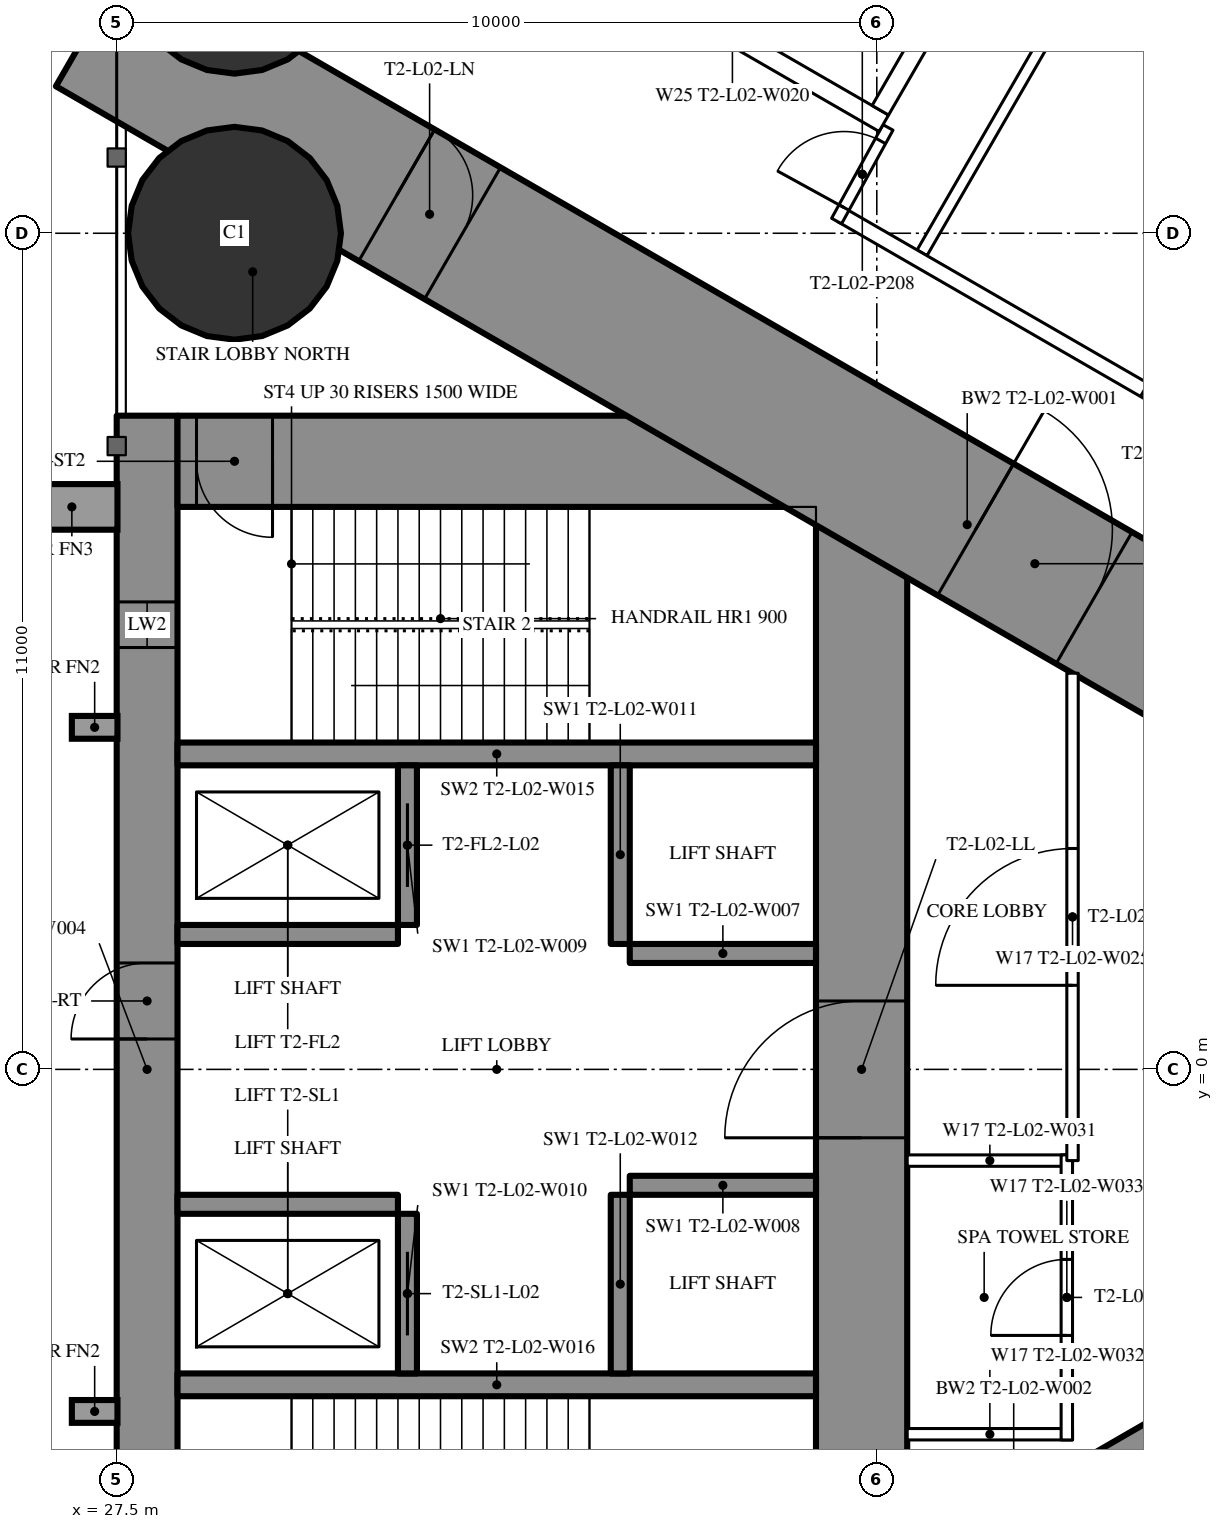
"""IFC4 building model, lengths in metres.
Left out: names, types, materials, properties, quantities, classifications, styles, units other than length and angle.
Written with IfcOpenShell. Run it as: python <this file> out.ifc"""

import sys

from ifc_helpers import new_model, si_unit, direction, frame, frame_2d, origin, origin_2d, place, context, subcontext, project, spatial, rectangle, hollow_circle, extrude, element, fill, save


model = new_model("IFC4")
c1 = context("Model", 3, precision=1e-05, world=origin(), true_north=direction((0.0, 1.0)))
c2 = subcontext(c1, "Body", "Model", "MODEL_VIEW")
j1 = project(units=[si_unit("LENGTHUNIT", "METRE"), si_unit("PLANEANGLEUNIT", "RADIAN")], contexts=[c1])
p1 = place(None, origin())
s1 = spatial("IfcSite", under=j1, at=p1, CompositionType="ELEMENT")
p2 = place(p1, origin())
s2 = spatial("IfcBuilding", under=s1, at=p2, CompositionType="ELEMENT")
p3 = place(p2, frame((0.0, 0.0, 12.6)))
s3 = spatial("IfcBuildingStorey", under=s2, at=p3, CompositionType="ELEMENT", Elevation=12.6)
for number, where, z_axis, x_axis in (
    (1, (29.05, 11.0, 0.0), (0.0, 0.0, 1.0), (1.0, 0.0, 0.0)),
    (2, (29.05, 14.5, 0.0), (0.0, 0.0, 1.0), (1.0, 0.0, 0.0)),
):
    element("IfcColumn", number, at=place(p3, frame(where, z_axis=z_axis, x_axis=x_axis)), inside=s3, PredefinedType="COLUMN", context=c2, shape_type="SweptSolid", body=[
        extrude(hollow_circle(Radius=1.4, WallThickness=0.12, at=origin_2d()), origin(), (0.0, 0.0, 1.0), 5.4),
    ])
p4 = place(p3, frame((27.9, -8.6, 0.0), z_axis=(0.0, 0.0, 1.0), x_axis=(0.0, 1.0, 0.0)))
e3 = element("IfcWall", 3, at=p4, inside=s3, PredefinedType="SHEAR", context=c2, shape_type="SweptSolid", body=[
    extrude(rectangle(XDim=17.2, YDim=0.8, at=frame_2d((8.6, 0.0))), origin(), (0.0, 0.0, 1.0), 5.4),
])
p5 = place(p4, frame((9.0, 0.0, 0.0)))
e4 = element("IfcOpeningElement", 4, at=p5, cuts=e3, PredefinedType="OPENING", context=c2, shape_type="SweptSolid", body=[
    extrude(rectangle(XDim=1.0, YDim=2.2, at=frame_2d((0.5, 1.1))), frame((0.0, 0.41, 0.0), z_axis=(0.0, -1.0, 0.0), x_axis=(1.0, 0.0, 0.0)), (0.0, 0.0, 1.0), 0.82),
])
p6 = place(p4, frame((2.45, 0.0, 0.6)))
e5 = element("IfcOpeningElement", 5, at=p6, cuts=e3, PredefinedType="OPENING", context=c2, shape_type="SweptSolid", body=[
    extrude(rectangle(XDim=0.6, YDim=3.9, at=frame_2d((0.3, 1.95))), frame((0.0, 0.41, 0.0), z_axis=(0.0, -1.0, 0.0), x_axis=(1.0, 0.0, 0.0)), (0.0, 0.0, 1.0), 0.82),
])
p7 = place(p4, frame((14.15, 0.0, 0.6)))
e6 = element("IfcOpeningElement", 6, at=p7, cuts=e3, PredefinedType="OPENING", context=c2, shape_type="SweptSolid", body=[
    extrude(rectangle(XDim=0.6, YDim=3.9, at=frame_2d((0.3, 1.95))), frame((0.0, 0.41, 0.0), z_axis=(0.0, -1.0, 0.0), x_axis=(1.0, 0.0, 0.0)), (0.0, 0.0, 1.0), 0.82),
])
p8 = place(p3, frame((37.3, -8.6, 0.0), z_axis=(0.0, 0.0, 1.0), x_axis=(0.0, 1.0, 0.0)))
e7 = element("IfcWall", 7, at=p8, inside=s3, PredefinedType="SHEAR", context=c2, shape_type="SweptSolid", body=[
    extrude(rectangle(XDim=17.2, YDim=1.2, at=frame_2d((8.6, 0.0))), origin(), (0.0, 0.0, 1.0), 5.4),
])
p9 = place(p8, frame((7.7, 0.0, 0.0)))
e8 = element("IfcOpeningElement", 8, at=p9, cuts=e7, PredefinedType="OPENING", context=c2, shape_type="SweptSolid", body=[
    extrude(rectangle(XDim=1.8, YDim=2.2, at=frame_2d((0.9, 1.1))), frame((0.0, 0.61, 0.0), z_axis=(0.0, -1.0, 0.0), x_axis=(1.0, 0.0, 0.0)), (0.0, 0.0, 1.0), 1.22),
])
p10 = place(p3, frame((28.3, 8.0, 0.0), z_axis=(0.0, 0.0, 1.0), x_axis=(1.0, 0.0, 0.0)))
e9 = element("IfcWall", 9, at=p10, inside=s3, PredefinedType="SHEAR", context=c2, shape_type="SweptSolid", body=[
    extrude(rectangle(XDim=8.4, YDim=1.2, at=frame_2d((4.2, 0.0))), origin(), (0.0, 0.0, 1.0), 5.4),
])
p11 = place(p10, frame((0.25, 0.0, 0.0)))
e10 = element("IfcOpeningElement", 10, at=p11, cuts=e9, PredefinedType="OPENING", context=c2, shape_type="SweptSolid", body=[
    extrude(rectangle(XDim=1.0, YDim=2.2, at=frame_2d((0.5, 1.1))), frame((0.0, 0.61, 0.0), z_axis=(0.0, -1.0, 0.0), x_axis=(1.0, 0.0, 0.0)), (0.0, 0.0, 1.0), 1.22),
])
for number, where, z_axis, x_axis in (
    (11, (28.3, -4.15, 0.0), (0.0, 0.0, 1.0), (1.0, 0.0, 0.0)),
    (12, (28.3, 4.15, 0.0), (0.0, 0.0, 1.0), (1.0, 0.0, 0.0)),
):
    element("IfcWall", number, at=place(p3, frame(where, z_axis=z_axis, x_axis=x_axis)), inside=s3, PredefinedType="SHEAR", context=c2, shape_type="SweptSolid", body=[
        extrude(rectangle(XDim=8.4, YDim=0.3, at=frame_2d((4.2, 0.0))), origin(), (0.0, 0.0, 1.0), 5.4),
    ])
p12 = place(p3, frame((31.325, -4.0, 0.0), z_axis=(0.0, 0.0, 1.0), x_axis=(0.0, 1.0, 0.0)))
e13 = element("IfcWall", 13, at=p12, inside=s3, PredefinedType="SHEAR", context=c2, shape_type="SweptSolid", body=[
    extrude(rectangle(XDim=2.1, YDim=0.25, at=frame_2d((1.05, 0.0))), origin(), (0.0, 0.0, 1.0), 5.4),
])
p13 = place(p12, frame((0.5, 0.0, 0.0)))
e14 = element("IfcOpeningElement", 14, at=p13, cuts=e13, PredefinedType="OPENING", context=c2, shape_type="SweptSolid", body=[
    extrude(rectangle(XDim=1.1, YDim=2.2, at=frame_2d((0.55, 1.1))), frame((0.0, 0.135, 0.0), z_axis=(0.0, -1.0, 0.0), x_axis=(1.0, 0.0, 0.0)), (0.0, 0.0, 1.0), 0.27),
])
p14 = place(p3, frame((34.125, -4.0, 0.0), z_axis=(0.0, 0.0, 1.0), x_axis=(0.0, 1.0, 0.0)))
e15 = element("IfcWall", 15, at=p14, inside=s3, PredefinedType="SHEAR", context=c2, shape_type="SweptSolid", body=[
    extrude(rectangle(XDim=2.35, YDim=0.25, at=frame_2d((1.175, 0.0))), origin(), (0.0, 0.0, 1.0), 5.4),
])
p15 = place(p3, frame((28.3, -1.775, 0.0), z_axis=(0.0, 0.0, 1.0), x_axis=(1.0, 0.0, 0.0)))
e16 = element("IfcWall", 16, at=p15, inside=s3, PredefinedType="SHEAR", context=c2, shape_type="SweptSolid", body=[
    extrude(rectangle(XDim=2.9, YDim=0.25, at=frame_2d((1.45, 0.0))), origin(), (0.0, 0.0, 1.0), 5.4),
])
p16 = place(p3, frame((34.25, -1.525, 0.0), z_axis=(0.0, 0.0, 1.0), x_axis=(1.0, 0.0, 0.0)))
e17 = element("IfcWall", 17, at=p16, inside=s3, PredefinedType="SHEAR", context=c2, shape_type="SweptSolid", body=[
    extrude(rectangle(XDim=2.45, YDim=0.25, at=frame_2d((1.225, 0.0))), origin(), (0.0, 0.0, 1.0), 5.4),
])
p17 = place(p3, frame((31.325, 1.9, 0.0), z_axis=(0.0, 0.0, 1.0), x_axis=(0.0, 1.0, 0.0)))
e18 = element("IfcWall", 18, at=p17, inside=s3, PredefinedType="SHEAR", context=c2, shape_type="SweptSolid", body=[
    extrude(rectangle(XDim=2.1, YDim=0.25, at=frame_2d((1.05, 0.0))), origin(), (0.0, 0.0, 1.0), 5.4),
])
p18 = place(p17, frame((0.5, 0.0, 0.0)))
e19 = element("IfcOpeningElement", 19, at=p18, cuts=e18, PredefinedType="OPENING", context=c2, shape_type="SweptSolid", body=[
    extrude(rectangle(XDim=1.1, YDim=2.2, at=frame_2d((0.55, 1.1))), frame((0.0, 0.135, 0.0), z_axis=(0.0, -1.0, 0.0), x_axis=(1.0, 0.0, 0.0)), (0.0, 0.0, 1.0), 0.27),
])
p19 = place(p3, frame((34.125, 1.65, 0.0), z_axis=(0.0, 0.0, 1.0), x_axis=(0.0, 1.0, 0.0)))
e20 = element("IfcWall", 20, at=p19, inside=s3, PredefinedType="SHEAR", context=c2, shape_type="SweptSolid", body=[
    extrude(rectangle(XDim=2.35, YDim=0.25, at=frame_2d((1.175, 0.0))), origin(), (0.0, 0.0, 1.0), 5.4),
])
p20 = place(p3, frame((28.3, 1.775, 0.0), z_axis=(0.0, 0.0, 1.0), x_axis=(1.0, 0.0, 0.0)))
e21 = element("IfcWall", 21, at=p20, inside=s3, PredefinedType="SHEAR", context=c2, shape_type="SweptSolid", body=[
    extrude(rectangle(XDim=2.9, YDim=0.25, at=frame_2d((1.45, 0.0))), origin(), (0.0, 0.0, 1.0), 5.4),
])
p21 = place(p3, frame((34.25, 1.525, 0.0), z_axis=(0.0, 0.0, 1.0), x_axis=(1.0, 0.0, 0.0)))
e22 = element("IfcWall", 22, at=p21, inside=s3, PredefinedType="SHEAR", context=c2, shape_type="SweptSolid", body=[
    extrude(rectangle(XDim=2.45, YDim=0.25, at=frame_2d((1.225, 0.0))), origin(), (0.0, 0.0, 1.0), 5.4),
])
p22 = place(p3, frame((27.2, -13.8, 0.0), z_axis=(0.0, 0.0, 1.0), x_axis=(0.866027159892, 0.499996958321, 0.0)))
e23 = element("IfcWall", 23, at=p22, inside=s3, PredefinedType="SHEAR", context=c2, shape_type="SweptSolid", body=[
    extrude(rectangle(XDim=27.947, YDim=2.0, at=frame_2d((13.973, 0.0))), origin(), (0.0, 0.0, 1.0), 5.4),
])
p23 = place(p22, frame((4.6, 0.0, 0.0)))
e24 = element("IfcOpeningElement", 24, at=p23, cuts=e23, PredefinedType="OPENING", context=c2, shape_type="SweptSolid", body=[
    extrude(rectangle(XDim=1.0, YDim=2.2, at=frame_2d((0.5, 1.1))), frame((0.0, 1.01, 0.0), z_axis=(0.0, -1.0, 0.0), x_axis=(1.0, 0.0, 0.0)), (0.0, 0.0, 1.0), 2.02),
])
p24 = place(p22, frame((13.395, 0.0, 0.0)))
e25 = element("IfcOpeningElement", 25, at=p24, cuts=e23, PredefinedType="OPENING", context=c2, shape_type="SweptSolid", body=[
    extrude(rectangle(XDim=1.8, YDim=2.2, at=frame_2d((0.9, 1.1))), frame((0.0, 1.01, 0.0), z_axis=(0.0, -1.0, 0.0), x_axis=(1.0, 0.0, 0.0)), (0.0, 0.0, 1.0), 2.02),
])
p25 = place(p3, frame((27.2, 13.8, 0.0), z_axis=(0.0, 0.0, 1.0), x_axis=(0.866024545924, -0.500001485854, 0.0)))
e26 = element("IfcWall", 26, at=p25, inside=s3, PredefinedType="SHEAR", context=c2, shape_type="SweptSolid", body=[
    extrude(rectangle(XDim=26.534, YDim=2.0, at=frame_2d((13.267, 0.0))), origin(), (0.0, 0.0, 1.0), 5.4),
])
p26 = place(p25, frame((4.6, 0.0, 0.0)))
e27 = element("IfcOpeningElement", 27, at=p26, cuts=e26, PredefinedType="OPENING", context=c2, shape_type="SweptSolid", body=[
    extrude(rectangle(XDim=1.0, YDim=2.2, at=frame_2d((0.5, 1.1))), frame((0.0, 1.01, 0.0), z_axis=(0.0, -1.0, 0.0), x_axis=(1.0, 0.0, 0.0)), (0.0, 0.0, 1.0), 2.02),
])
p27 = place(p25, frame((13.395, 0.0, 0.0)))
e28 = element("IfcOpeningElement", 28, at=p27, cuts=e26, PredefinedType="OPENING", context=c2, shape_type="SweptSolid", body=[
    extrude(rectangle(XDim=1.8, YDim=2.2, at=frame_2d((0.9, 1.1))), frame((0.0, 1.01, 0.0), z_axis=(0.0, -1.0, 0.0), x_axis=(1.0, 0.0, 0.0)), (0.0, 0.0, 1.0), 2.02),
])
p28 = place(p3, frame((38.095, 10.743, 0.0), z_axis=(0.0, 0.0, 1.0), x_axis=(0.499989105942, 0.866031693381, 0.0)))
e29 = element("IfcWall", 29, at=p28, inside=s3, PredefinedType="PARTITIONING", context=c2, shape_type="SweptSolid", body=[
    extrude(rectangle(XDim=9.194, YDim=0.15, at=frame_2d((4.597, 0.0))), origin(), (0.0, 0.0, 1.0), 4.15),
])
p29 = place(p3, frame((38.16, -10.59, 0.0), z_axis=(0.0, 0.0, 1.0), x_axis=(0.866027029586, 0.499997184019, 0.0)))
e30 = element("IfcWall", 30, at=p29, inside=s3, PredefinedType="PARTITIONING", context=c2, shape_type="SweptSolid", body=[
    extrude(rectangle(XDim=21.18, YDim=0.2, at=frame_2d((10.59, 0.0))), origin(), (0.0, 0.0, 1.0), 4.25),
])
p30 = place(p29, frame((14.142, 0.0, 0.0)))
e31 = element("IfcOpeningElement", 31, at=p30, cuts=e30, PredefinedType="OPENING", context=c2, shape_type="SweptSolid", body=[
    extrude(rectangle(XDim=1.8, YDim=2.2, at=frame_2d((0.9, 1.1))), frame((0.0, 0.11, 0.0), z_axis=(0.0, -1.0, 0.0), x_axis=(1.0, 0.0, 0.0)), (0.0, 0.0, 1.0), 0.22),
])
p31 = place(p29, frame((18.183, 0.0, 0.0)))
e32 = element("IfcOpeningElement", 32, at=p31, cuts=e30, PredefinedType="OPENING", context=c2, shape_type="SweptSolid", body=[
    extrude(rectangle(XDim=1.8, YDim=2.2, at=frame_2d((0.9, 1.1))), frame((0.0, 0.11, 0.0), z_axis=(0.0, -1.0, 0.0), x_axis=(1.0, 0.0, 0.0)), (0.0, 0.0, 1.0), 0.22),
])
p32 = place(p29, frame((5.65, 0.0, 0.0)))
e33 = element("IfcOpeningElement", 33, at=p32, cuts=e30, PredefinedType="OPENING", context=c2, shape_type="SweptSolid", body=[
    extrude(rectangle(XDim=1.8, YDim=2.2, at=frame_2d((0.9, 1.1))), frame((0.0, 0.11, 0.0), z_axis=(0.0, -1.0, 0.0), x_axis=(1.0, 0.0, 0.0)), (0.0, 0.0, 1.0), 0.22),
])
p33 = place(p3, frame((37.034, 11.24, 0.0), z_axis=(0.0, 0.0, 1.0), x_axis=(0.866025942536, -0.499999066854, 0.0)))
e34 = element("IfcWall", 34, at=p33, inside=s3, PredefinedType="PARTITIONING", context=c2, shape_type="SweptSolid", body=[
    extrude(rectangle(XDim=22.36, YDim=0.2, at=frame_2d((11.18, 0.0))), origin(), (0.0, 0.0, 1.0), 4.25),
])
p34 = place(p33, frame((19.423, 0.0, 0.0)))
e35 = element("IfcOpeningElement", 35, at=p34, cuts=e34, PredefinedType="OPENING", context=c2, shape_type="SweptSolid", body=[
    extrude(rectangle(XDim=1.8, YDim=2.2, at=frame_2d((0.9, 1.1))), frame((0.0, 0.11, 0.0), z_axis=(0.0, -1.0, 0.0), x_axis=(1.0, 0.0, 0.0)), (0.0, 0.0, 1.0), 0.22),
])
p35 = place(p33, frame((13.274, 0.0, 0.0)))
e36 = element("IfcOpeningElement", 36, at=p35, cuts=e34, PredefinedType="OPENING", context=c2, shape_type="SweptSolid", body=[
    extrude(rectangle(XDim=1.8, YDim=2.2, at=frame_2d((0.9, 1.1))), frame((0.0, 0.11, 0.0), z_axis=(0.0, -1.0, 0.0), x_axis=(1.0, 0.0, 0.0)), (0.0, 0.0, 1.0), 0.22),
])
p36 = place(p33, frame((4.602, 0.0, 0.0)))
e37 = element("IfcOpeningElement", 37, at=p36, cuts=e34, PredefinedType="OPENING", context=c2, shape_type="SweptSolid", body=[
    extrude(rectangle(XDim=1.8, YDim=2.2, at=frame_2d((0.9, 1.1))), frame((0.0, 0.11, 0.0), z_axis=(0.0, -1.0, 0.0), x_axis=(1.0, 0.0, 0.0)), (0.0, 0.0, 1.0), 0.22),
])
p37 = place(p3, frame((36.971, 11.161, 0.0), z_axis=(0.0, 0.0, 1.0), x_axis=(0.481491794093, 0.876450598848, 0.0)))
e38 = element("IfcWall", 38, at=p37, inside=s3, PredefinedType="PARTITIONING", context=c2, shape_type="SweptSolid", body=[
    extrude(rectangle(XDim=1.405, YDim=0.15, at=frame_2d((0.703, 0.0))), origin(), (0.0, 0.0, 1.0), 5.15),
])
p38 = place(p37, frame((0.203, 0.0, 0.0)))
e39 = element("IfcOpeningElement", 39, at=p38, cuts=e38, PredefinedType="OPENING", context=c2, shape_type="SweptSolid", body=[
    extrude(rectangle(XDim=1.0, YDim=2.2, at=frame_2d((0.5, 1.1))), frame((0.0, 0.085, 0.0), z_axis=(0.0, -1.0, 0.0), x_axis=(1.0, 0.0, 0.0)), (0.0, 0.0, 1.0), 0.17),
])
for number, where, z_axis, x_axis in (
    (40, (37.9, -1.2, 0.0), (0.0, 0.0, 1.0), (1.0, 0.0, 0.0)),
    (41, (37.9, -4.8, 0.0), (0.0, 0.0, 1.0), (1.0, 0.0, 0.0)),
):
    element("IfcWall", number, at=place(p3, frame(where, z_axis=z_axis, x_axis=x_axis)), inside=s3, PredefinedType="PARTITIONING", context=c2, shape_type="SweptSolid", body=[
        extrude(rectangle(XDim=2.175, YDim=0.15, at=frame_2d((1.087, 0.0))), origin(), (0.0, 0.0, 1.0), 5.15),
    ])
p39 = place(p3, frame((40.0, -4.875, 0.0), z_axis=(0.0, 0.0, 1.0), x_axis=(0.0, 1.0, 0.0)))
e42 = element("IfcWall", 42, at=p39, inside=s3, PredefinedType="PARTITIONING", context=c2, shape_type="SweptSolid", body=[
    extrude(rectangle(XDim=3.75, YDim=0.15, at=frame_2d((1.875, 0.0))), origin(), (0.0, 0.0, 1.0), 5.15),
])
p40 = place(p39, frame((1.375, 0.0, 0.0)))
e43 = element("IfcOpeningElement", 43, at=p40, cuts=e42, PredefinedType="OPENING", context=c2, shape_type="SweptSolid", body=[
    extrude(rectangle(XDim=1.0, YDim=2.2, at=frame_2d((0.5, 1.1))), frame((0.0, 0.085, 0.0), z_axis=(0.0, -1.0, 0.0), x_axis=(1.0, 0.0, 0.0)), (0.0, 0.0, 1.0), 0.17),
])
p41 = place(p3, frame((40.075, -1.2, 0.0), z_axis=(0.0, 0.0, 1.0), x_axis=(0.0, 1.0, 0.0)))
e44 = element("IfcWall", 44, at=p41, inside=s3, PredefinedType="PARTITIONING", context=c2, shape_type="SweptSolid", body=[
    extrude(rectangle(XDim=6.412, YDim=0.15, at=frame_2d((3.206, 0.0))), origin(), (0.0, 0.0, 1.0), 5.15),
])
p42 = place(p41, frame((2.306, 0.0, 0.0)))
e45 = element("IfcOpeningElement", 45, at=p42, cuts=e44, PredefinedType="OPENING", context=c2, shape_type="SweptSolid", body=[
    extrude(rectangle(XDim=1.8, YDim=2.2, at=frame_2d((0.9, 1.1))), frame((0.0, 0.085, 0.0), z_axis=(0.0, -1.0, 0.0), x_axis=(1.0, 0.0, 0.0)), (0.0, 0.0, 1.0), 0.17),
])
p43 = place(p3, frame((33.608, 14.747, 0.0), z_axis=(0.0, 0.0, 1.0), x_axis=(0.866043305498, -0.49996899204, 0.0)))
e46 = element("IfcWall", 46, at=p43, inside=s3, PredefinedType="PARTITIONING", context=c2, shape_type="SweptSolid", body=[
    extrude(rectangle(XDim=4.6, YDim=0.25, at=frame_2d((2.3, 0.0))), origin(), (0.0, 0.0, 1.0), 5.15),
])
p44 = place(p3, frame((37.547, 12.618, 0.0), z_axis=(0.0, 0.0, 1.0), x_axis=(0.499929347863, 0.866066190972, 0.0)))
e47 = element("IfcWall", 47, at=p44, inside=s3, PredefinedType="PARTITIONING", context=c2, shape_type="SweptSolid", body=[
    extrude(rectangle(XDim=3.201, YDim=0.25, at=frame_2d((1.6, 0.0))), origin(), (0.0, 0.0, 1.0), 5.15),
])
p45 = place(p38, origin())
e48 = element("IfcDoor", 48, at=p45, inside=s3, OperationType="SINGLE_SWING_LEFT", PredefinedType="DOOR", context=c2, shape_type="SweptSolid", body=[
    extrude(rectangle(XDim=1.0, YDim=2.2, at=frame_2d((0.5, 1.1))), frame((0.0, 0.025, 0.0), z_axis=(0.0, -1.0, 0.0), x_axis=(1.0, 0.0, 0.0)), (0.0, 0.0, 1.0), 0.05),
])
fill(e39, e48)
p46 = place(p40, origin())
e49 = element("IfcDoor", 49, at=p46, inside=s3, OperationType="SINGLE_SWING_LEFT", PredefinedType="DOOR", context=c2, shape_type="SweptSolid", body=[
    extrude(rectangle(XDim=1.0, YDim=2.2, at=frame_2d((0.5, 1.1))), frame((0.0, 0.025, 0.0), z_axis=(0.0, -1.0, 0.0), x_axis=(1.0, 0.0, 0.0)), (0.0, 0.0, 1.0), 0.05),
])
fill(e43, e49)
p47 = place(p42, origin())
e50 = element("IfcDoor", 50, at=p47, inside=s3, OperationType="DOUBLE_DOOR_SINGLE_SWING", PredefinedType="DOOR", context=c2, shape_type="SweptSolid", body=[
    extrude(rectangle(XDim=1.8, YDim=2.2, at=frame_2d((0.9, 1.1))), frame((0.0, 0.025, 0.0), z_axis=(0.0, -1.0, 0.0), x_axis=(1.0, 0.0, 0.0)), (0.0, 0.0, 1.0), 0.05),
])
fill(e45, e50)
p48 = place(p26, origin())
e51 = element("IfcDoor", 51, at=p48, inside=s3, OperationType="SINGLE_SWING_LEFT", PredefinedType="DOOR", context=c2, shape_type="SweptSolid", body=[
    extrude(rectangle(XDim=1.0, YDim=2.2, at=frame_2d((0.5, 1.1))), frame((0.0, 0.025, 0.0), z_axis=(0.0, -1.0, 0.0), x_axis=(1.0, 0.0, 0.0)), (0.0, 0.0, 1.0), 0.05),
])
fill(e27, e51)
p49 = place(p27, origin())
e52 = element("IfcDoor", 52, at=p49, inside=s3, OperationType="DOUBLE_DOOR_SINGLE_SWING", PredefinedType="DOOR", context=c2, shape_type="SweptSolid", body=[
    extrude(rectangle(XDim=1.8, YDim=2.2, at=frame_2d((0.9, 1.1))), frame((0.0, 0.025, 0.0), z_axis=(0.0, -1.0, 0.0), x_axis=(1.0, 0.0, 0.0)), (0.0, 0.0, 1.0), 0.05),
])
fill(e28, e52)
p50 = place(p9, origin())
e53 = element("IfcDoor", 53, at=p50, inside=s3, OperationType="DOUBLE_DOOR_SINGLE_SWING", PredefinedType="DOOR", context=c2, shape_type="SweptSolid", body=[
    extrude(rectangle(XDim=1.8, YDim=2.2, at=frame_2d((0.9, 1.1))), frame((0.0, 0.025, 0.0), z_axis=(0.0, -1.0, 0.0), x_axis=(1.0, 0.0, 0.0)), (0.0, 0.0, 1.0), 0.05),
])
fill(e8, e53)
p51 = place(p11, origin())
e54 = element("IfcDoor", 54, at=p51, inside=s3, OperationType="SINGLE_SWING_RIGHT", PredefinedType="DOOR", context=c2, shape_type="SweptSolid", body=[
    extrude(rectangle(XDim=1.0, YDim=2.2, at=frame_2d((0.5, 1.1))), frame((0.0, 0.025, 0.0), z_axis=(0.0, -1.0, 0.0), x_axis=(1.0, 0.0, 0.0)), (0.0, 0.0, 1.0), 0.05),
])
fill(e10, e54)
p52 = place(p5, origin())
e55 = element("IfcDoor", 55, at=p52, inside=s3, OperationType="SINGLE_SWING_LEFT", PredefinedType="DOOR", context=c2, shape_type="SweptSolid", body=[
    extrude(rectangle(XDim=1.0, YDim=2.2, at=frame_2d((0.5, 1.1))), frame((0.0, 0.025, 0.0), z_axis=(0.0, -1.0, 0.0), x_axis=(1.0, 0.0, 0.0)), (0.0, 0.0, 1.0), 0.05),
])
fill(e4, e55)
p53 = place(p13, origin())
e56 = element("IfcDoor", 56, at=p53, inside=s3, OperationType="SLIDING_TO_LEFT", PredefinedType="USERDEFINED", context=c2, shape_type="SweptSolid", body=[
    extrude(rectangle(XDim=1.1, YDim=2.2, at=frame_2d((0.55, 1.1))), frame((0.0, 0.025, 0.0), z_axis=(0.0, -1.0, 0.0), x_axis=(1.0, 0.0, 0.0)), (0.0, 0.0, 1.0), 0.05),
])
fill(e14, e56)
p54 = place(p18, origin())
e57 = element("IfcDoor", 57, at=p54, inside=s3, OperationType="SLIDING_TO_LEFT", PredefinedType="USERDEFINED", context=c2, shape_type="SweptSolid", body=[
    extrude(rectangle(XDim=1.1, YDim=2.2, at=frame_2d((0.55, 1.1))), frame((0.0, 0.025, 0.0), z_axis=(0.0, -1.0, 0.0), x_axis=(1.0, 0.0, 0.0)), (0.0, 0.0, 1.0), 0.05),
])
fill(e19, e57)
p55 = place(p7, origin())
e58 = element("IfcWindow", 58, at=p55, inside=s3, PartitioningType="SINGLE_PANEL", PredefinedType="WINDOW", context=c2, shape_type="SweptSolid", body=[
    extrude(rectangle(XDim=0.6, YDim=3.9, at=frame_2d((0.3, 1.95))), frame((0.0, 0.03, 0.0), z_axis=(0.0, -1.0, 0.0), x_axis=(1.0, 0.0, 0.0)), (0.0, 0.0, 1.0), 0.06),
])
fill(e6, e58)
save(model, sys.argv[1])
